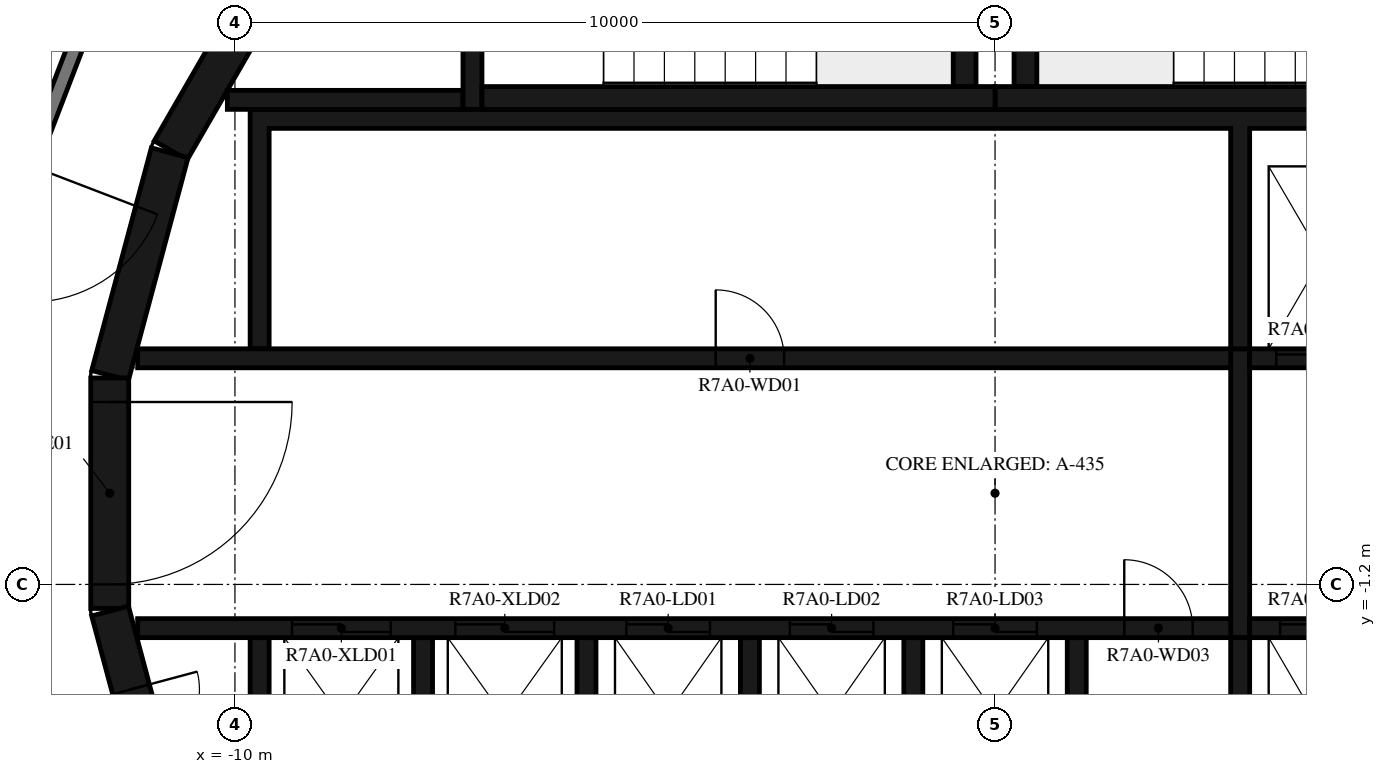
"""IFC4 building model, lengths in metres.
Left out: names, types, materials, properties, quantities, classifications, styles, units other than length and angle.
Written with IfcOpenShell. Run it as: python <this file> out.ifc"""

import sys

from ifc_helpers import new_model, si_unit, direction, frame, frame_2d, origin, place, context, subcontext, project, spatial, polyline, rectangle, outline, extrude, element, fill, save


model = new_model("IFC4")
c1 = context("Model", 3, precision=1e-05, world=origin(), true_north=direction((0.0, 1.0)))
c2 = subcontext(c1, "Body", "Model", "MODEL_VIEW")
j1 = project(units=[si_unit("LENGTHUNIT", "METRE"), si_unit("PLANEANGLEUNIT", "RADIAN")], contexts=[c1])
p1 = place(None, origin())
s1 = spatial("IfcSite", under=j1, at=p1, CompositionType="ELEMENT")
p2 = place(p1, origin())
s2 = spatial("IfcBuilding", under=s1, at=p2, CompositionType="ELEMENT")
p3 = place(p2, frame((0.0, 0.0, 270.4)))
s3 = spatial("IfcBuildingStorey", under=s2, at=p3, CompositionType="ELEMENT", Elevation=270.4)
for number, where, z_axis, x_axis in (
    (1, (-9.329, 7.137, 0.0), (0.0, 0.0, 1.0), (-0.5, -0.866, 0.0)),
    (2, (-10.858, 4.479, 0.0), (0.0, 0.0, 1.0), (-0.259, -0.966, 0.0)),
):
    element("IfcWall", number, at=place(p3, frame(where, z_axis=z_axis, x_axis=x_axis)), inside=s3, PredefinedType="SHEAR", context=c2, shape_type="SweptSolid", body=[
        extrude(rectangle(XDim=3.033, YDim=0.5, at=frame_2d((1.516, 0.0))), origin(), (0.0, 0.0, 1.0), 3.12),
    ])
p4 = place(p3, frame((-11.647, 1.516, 0.0), z_axis=(0.0, 0.0, 1.0), x_axis=(0.0, -1.0, 0.0)))
e3 = element("IfcWall", 3, at=p4, inside=s3, PredefinedType="SHEAR", context=c2, shape_type="SweptSolid", body=[
    extrude(rectangle(XDim=3.033, YDim=0.5, at=frame_2d((1.516, 0.0))), origin(), (0.0, 0.0, 1.0), 3.12),
])
p5 = place(p4, frame((0.316, 0.0, 0.0)))
e4 = element("IfcOpeningElement", 4, at=p5, cuts=e3, PredefinedType="OPENING", context=c2, shape_type="SweptSolid", body=[
    extrude(rectangle(XDim=2.4, YDim=2.1, at=frame_2d((1.2, 1.05))), frame((0.0, 0.26, 0.0), z_axis=(0.0, -1.0, 0.0), x_axis=(1.0, 0.0, 0.0)), (0.0, 0.0, 1.0), 0.52),
])
p6 = place(p3, frame((-11.643, -1.55, 0.0), z_axis=(0.0, 0.0, 1.0), x_axis=(0.258734743916, -0.965948410781, 0.0)))
e5 = element("IfcWall", 5, at=p6, inside=s3, PredefinedType="SHEAR", context=c2, shape_type="SweptSolid", body=[
    extrude(rectangle(XDim=3.033, YDim=0.5, at=frame_2d((1.516, 0.0))), origin(), (0.0, 0.0, 1.0), 3.12),
])
p7 = place(p6, frame((1.066, 0.0, 0.0)))
e6 = element("IfcOpeningElement", 6, at=p7, cuts=e5, PredefinedType="OPENING", context=c2, shape_type="SweptSolid", body=[
    extrude(rectangle(XDim=0.9, YDim=2.1, at=frame_2d((0.45, 1.05))), frame((0.0, 0.26, 0.0), z_axis=(0.0, -1.0, 0.0), x_axis=(1.0, 0.0, 0.0)), (0.0, 0.0, 1.0), 0.52),
])
p8 = place(p3, frame((0.0, 5.2, 0.0), z_axis=(0.0, 0.0, 1.0), x_axis=(1.0, 0.0, 0.0)))
e7 = element("IfcWall", 7, at=p8, inside=s3, PredefinedType="SHEAR", context=c2, shape_type="SweptSolid", body=[
    extrude(rectangle(XDim=6.75, YDim=0.3, at=frame_2d((3.375, 0.0))), origin(), (0.0, 0.0, 1.0), 3.12),
])
p9 = place(p3, frame((0.4, 5.35, 0.0), z_axis=(0.0, 0.0, 1.0), x_axis=(0.0, 1.0, 0.0)))
e8 = element("IfcWall", 8, at=p9, inside=s3, PredefinedType="SHEAR", context=c2, shape_type="SweptSolid", body=[
    extrude(rectangle(XDim=3.32, YDim=0.3, at=frame_2d((1.66, 0.0))), origin(), (0.0, 0.0, 1.0), 3.12),
])
p10 = place(p3, frame((-6.75, 5.2, 0.0), z_axis=(0.0, 0.0, 1.0), x_axis=(1.0, 0.0, 0.0)))
e9 = element("IfcWall", 9, at=p10, inside=s3, PredefinedType="SHEAR", context=c2, shape_type="SweptSolid", body=[
    extrude(rectangle(XDim=6.75, YDim=0.3, at=frame_2d((3.375, 0.0))), origin(), (0.0, 0.0, 1.0), 3.12),
])
p11 = place(p3, frame((-0.4, 5.35, 0.0), z_axis=(0.0, 0.0, 1.0), x_axis=(0.0, 1.0, 0.0)))
e10 = element("IfcWall", 10, at=p11, inside=s3, PredefinedType="SHEAR", context=c2, shape_type="SweptSolid", body=[
    extrude(rectangle(XDim=3.32, YDim=0.3, at=frame_2d((1.66, 0.0))), origin(), (0.0, 0.0, 1.0), 3.12),
])
p12 = place(p3, frame((-6.875, 8.97, 0.0), z_axis=(0.0, 0.0, 1.0), x_axis=(0.0, -1.0, 0.0)))
e11 = element("IfcWall", 11, at=p12, inside=s3, PredefinedType="SHEAR", context=c2, shape_type="SweptSolid", body=[
    extrude(rectangle(XDim=3.92, YDim=0.25, at=frame_2d((1.96, 0.0))), origin(), (0.0, 0.0, 1.0), 3.12),
])
p13 = place(p12, frame((1.61, 0.0, 0.0)))
e12 = element("IfcOpeningElement", 12, at=p13, cuts=e11, PredefinedType="OPENING", context=c2, shape_type="SweptSolid", body=[
    extrude(rectangle(XDim=1.2, YDim=2.1, at=frame_2d((0.6, 1.05))), frame((0.0, 0.135, 0.0), z_axis=(0.0, -1.0, 0.0), x_axis=(1.0, 0.0, 0.0)), (0.0, 0.0, 1.0), 0.27),
])
p14 = place(p3, frame((-7.0, 5.175, 0.0), z_axis=(0.0, 0.0, 1.0), x_axis=(-1.0, 0.0, 0.0)))
e13 = element("IfcWall", 13, at=p14, inside=s3, PredefinedType="SHEAR", context=c2, shape_type="SweptSolid", body=[
    extrude(rectangle(XDim=3.1, YDim=0.25, at=frame_2d((1.55, 0.0))), origin(), (0.0, 0.0, 1.0), 3.12),
])
p15 = place(p3, origin())
e14 = element("IfcWall", 14, at=p15, inside=s3, PredefinedType="SHEAR", context=c2, shape_type="SweptSolid", body=[
    extrude(outline(polyline([(-9.8, 1.9), (-9.55, 1.9), (-9.55, 4.8), (3.1, 4.8), (3.1, 1.9), (3.35, 1.9), (3.35, 4.8), (5.25, 4.8), (5.25, 1.9), (5.5, 1.9), (5.5, 4.8), (7.4, 4.8), (7.4, 1.9), (7.65, 1.9), (7.65, 4.8), (9.55, 4.8), (9.55, 1.9), (9.8, 1.9), (9.8, 4.8), (9.8, 5.05), (-9.8, 5.05), (-9.8, 4.8), (-9.8, 1.9)])), origin(), (0.0, 0.0, 1.0), 3.12),
])
p16 = place(p3, origin())
e15 = element("IfcWall", 15, at=p16, inside=s3, PredefinedType="SHEAR", context=c2, shape_type="SweptSolid", body=[
    extrude(outline(polyline([(9.8, -5.05), (9.8, -4.8), (9.8, -1.9), (9.55, -1.9), (9.55, -4.8), (7.65, -4.8), (7.65, -1.9), (7.4, -1.9), (7.4, -4.8), (5.5, -4.8), (5.5, -1.9), (5.25, -1.9), (5.25, -4.8), (3.35, -4.8), (3.35, -1.9), (3.1, -1.9), (3.1, -4.8), (1.2, -4.8), (1.2, -1.9), (0.95, -1.9), (0.95, -4.8), (-0.95, -4.8), (-0.95, -1.9), (-1.2, -1.9), (-1.2, -4.8), (-3.1, -4.8), (-3.1, -1.9), (-3.35, -1.9), (-3.35, -4.8), (-5.25, -4.8), (-5.25, -1.9), (-5.5, -1.9), (-5.5, -4.8), (-7.4, -4.8), (-7.4, -1.9), (-7.65, -1.9), (-7.65, -4.8), (-9.55, -4.8), (-9.55, -1.9), (-9.8, -1.9), (-9.8, -4.8), (-9.8, -5.05), (9.8, -5.05)])), origin(), (0.0, 0.0, 1.0), 3.12),
])
p17 = place(p3, frame((-11.28, 1.775, 0.0), z_axis=(0.0, 0.0, 1.0), x_axis=(1.0, 0.0, 0.0)))
e16 = element("IfcWall", 16, at=p17, inside=s3, PredefinedType="SHEAR", context=c2, shape_type="SweptSolid", body=[
    extrude(rectangle(XDim=14.38, YDim=0.25, at=frame_2d((7.19, 0.0))), origin(), (0.0, 0.0, 1.0), 3.12),
])
p18 = place(p17, frame((7.605, 0.0, 0.0)))
e17 = element("IfcOpeningElement", 17, at=p18, cuts=e16, PredefinedType="OPENING", context=c2, shape_type="SweptSolid", body=[
    extrude(rectangle(XDim=0.9, YDim=2.1, at=frame_2d((0.45, 1.05))), frame((0.0, 0.135, 0.0), z_axis=(0.0, -1.0, 0.0), x_axis=(1.0, 0.0, 0.0)), (0.0, 0.0, 1.0), 0.27),
])
p19 = place(p3, frame((3.35, 1.775, 0.0), z_axis=(0.0, 0.0, 1.0), x_axis=(1.0, 0.0, 0.0)))
e18 = element("IfcWall", 18, at=p19, inside=s3, PredefinedType="SHEAR", context=c2, shape_type="SweptSolid", body=[
    extrude(rectangle(XDim=7.93, YDim=0.25, at=frame_2d((3.965, 0.0))), origin(), (0.0, 0.0, 1.0), 3.12),
])
p20 = place(p19, frame((0.35, 0.0, 0.0)))
e19 = element("IfcOpeningElement", 19, at=p20, cuts=e18, PredefinedType="OPENING", context=c2, shape_type="SweptSolid", body=[
    extrude(rectangle(XDim=1.2, YDim=2.4, at=frame_2d((0.6, 1.2))), frame((0.0, 0.135, 0.0), z_axis=(0.0, -1.0, 0.0), x_axis=(1.0, 0.0, 0.0)), (0.0, 0.0, 1.0), 0.27),
])
p21 = place(p19, frame((2.5, 0.0, 0.0)))
e20 = element("IfcOpeningElement", 20, at=p21, cuts=e18, PredefinedType="OPENING", context=c2, shape_type="SweptSolid", body=[
    extrude(rectangle(XDim=1.2, YDim=2.4, at=frame_2d((0.6, 1.2))), frame((0.0, 0.135, 0.0), z_axis=(0.0, -1.0, 0.0), x_axis=(1.0, 0.0, 0.0)), (0.0, 0.0, 1.0), 0.27),
])
p22 = place(p19, frame((4.8, 0.0, 0.0)))
e21 = element("IfcOpeningElement", 21, at=p22, cuts=e18, PredefinedType="OPENING", context=c2, shape_type="SweptSolid", body=[
    extrude(rectangle(XDim=0.9, YDim=2.1, at=frame_2d((0.45, 1.05))), frame((0.0, 0.135, 0.0), z_axis=(0.0, -1.0, 0.0), x_axis=(1.0, 0.0, 0.0)), (0.0, 0.0, 1.0), 0.27),
])
p23 = place(p3, frame((-11.28, -1.775, 0.0), z_axis=(0.0, 0.0, 1.0), x_axis=(1.0, 0.0, 0.0)))
e22 = element("IfcWall", 22, at=p23, inside=s3, PredefinedType="SHEAR", context=c2, shape_type="SweptSolid", body=[
    extrude(rectangle(XDim=14.38, YDim=0.25, at=frame_2d((7.19, 0.0))), origin(), (0.0, 0.0, 1.0), 3.12),
])
p24 = place(p23, frame((2.03, 0.0, 0.0)))
e23 = element("IfcOpeningElement", 23, at=p24, cuts=e22, PredefinedType="OPENING", context=c2, shape_type="SweptSolid", body=[
    extrude(rectangle(XDim=1.3, YDim=2.1, at=frame_2d((0.65, 1.05))), frame((0.0, 0.135, 0.0), z_axis=(0.0, -1.0, 0.0), x_axis=(1.0, 0.0, 0.0)), (0.0, 0.0, 1.0), 0.27),
])
p25 = place(p23, frame((4.18, 0.0, 0.0)))
e24 = element("IfcOpeningElement", 24, at=p25, cuts=e22, PredefinedType="OPENING", context=c2, shape_type="SweptSolid", body=[
    extrude(rectangle(XDim=1.3, YDim=2.1, at=frame_2d((0.65, 1.05))), frame((0.0, 0.135, 0.0), z_axis=(0.0, -1.0, 0.0), x_axis=(1.0, 0.0, 0.0)), (0.0, 0.0, 1.0), 0.27),
])
p26 = place(p23, frame((6.43, 0.0, 0.0)))
e25 = element("IfcOpeningElement", 25, at=p26, cuts=e22, PredefinedType="OPENING", context=c2, shape_type="SweptSolid", body=[
    extrude(rectangle(XDim=1.1, YDim=2.1, at=frame_2d((0.55, 1.05))), frame((0.0, 0.135, 0.0), z_axis=(0.0, -1.0, 0.0), x_axis=(1.0, 0.0, 0.0)), (0.0, 0.0, 1.0), 0.27),
])
p27 = place(p23, frame((8.58, 0.0, 0.0)))
e26 = element("IfcOpeningElement", 26, at=p27, cuts=e22, PredefinedType="OPENING", context=c2, shape_type="SweptSolid", body=[
    extrude(rectangle(XDim=1.1, YDim=2.1, at=frame_2d((0.55, 1.05))), frame((0.0, 0.135, 0.0), z_axis=(0.0, -1.0, 0.0), x_axis=(1.0, 0.0, 0.0)), (0.0, 0.0, 1.0), 0.27),
])
p28 = place(p23, frame((10.73, 0.0, 0.0)))
e27 = element("IfcOpeningElement", 27, at=p28, cuts=e22, PredefinedType="OPENING", context=c2, shape_type="SweptSolid", body=[
    extrude(rectangle(XDim=1.1, YDim=2.1, at=frame_2d((0.55, 1.05))), frame((0.0, 0.135, 0.0), z_axis=(0.0, -1.0, 0.0), x_axis=(1.0, 0.0, 0.0)), (0.0, 0.0, 1.0), 0.27),
])
p29 = place(p23, frame((12.98, 0.0, 0.0)))
e28 = element("IfcOpeningElement", 28, at=p29, cuts=e22, PredefinedType="OPENING", context=c2, shape_type="SweptSolid", body=[
    extrude(rectangle(XDim=0.9, YDim=2.1, at=frame_2d((0.45, 1.05))), frame((0.0, 0.135, 0.0), z_axis=(0.0, -1.0, 0.0), x_axis=(1.0, 0.0, 0.0)), (0.0, 0.0, 1.0), 0.27),
])
p30 = place(p3, frame((3.35, -1.775, 0.0), z_axis=(0.0, 0.0, 1.0), x_axis=(1.0, 0.0, 0.0)))
e29 = element("IfcWall", 29, at=p30, inside=s3, PredefinedType="SHEAR", context=c2, shape_type="SweptSolid", body=[
    extrude(rectangle(XDim=7.93, YDim=0.25, at=frame_2d((3.965, 0.0))), origin(), (0.0, 0.0, 1.0), 3.12),
])
p31 = place(p30, frame((0.4, 0.0, 0.0)))
e30 = element("IfcOpeningElement", 30, at=p31, cuts=e29, PredefinedType="OPENING", context=c2, shape_type="SweptSolid", body=[
    extrude(rectangle(XDim=1.1, YDim=2.4, at=frame_2d((0.55, 1.2))), frame((0.0, 0.135, 0.0), z_axis=(0.0, -1.0, 0.0), x_axis=(1.0, 0.0, 0.0)), (0.0, 0.0, 1.0), 0.27),
])
p32 = place(p30, frame((2.55, 0.0, 0.0)))
e31 = element("IfcOpeningElement", 31, at=p32, cuts=e29, PredefinedType="OPENING", context=c2, shape_type="SweptSolid", body=[
    extrude(rectangle(XDim=1.1, YDim=2.4, at=frame_2d((0.55, 1.2))), frame((0.0, 0.135, 0.0), z_axis=(0.0, -1.0, 0.0), x_axis=(1.0, 0.0, 0.0)), (0.0, 0.0, 1.0), 0.27),
])
p33 = place(p30, frame((4.7, 0.0, 0.0)))
e32 = element("IfcOpeningElement", 32, at=p33, cuts=e29, PredefinedType="OPENING", context=c2, shape_type="SweptSolid", body=[
    extrude(rectangle(XDim=1.1, YDim=2.4, at=frame_2d((0.55, 1.2))), frame((0.0, 0.135, 0.0), z_axis=(0.0, -1.0, 0.0), x_axis=(1.0, 0.0, 0.0)), (0.0, 0.0, 1.0), 0.27),
])
p34 = place(p3, frame((3.225, -1.9, 0.0), z_axis=(0.0, 0.0, 1.0), x_axis=(0.0, 1.0, 0.0)))
e33 = element("IfcWall", 33, at=p34, inside=s3, PredefinedType="SHEAR", context=c2, shape_type="SweptSolid", body=[
    extrude(rectangle(XDim=3.8, YDim=0.25, at=frame_2d((1.9, 0.0))), origin(), (0.0, 0.0, 1.0), 3.12),
])
p35 = place(p3, frame((-11.223, 8.154, 0.0), z_axis=(0.0, 0.0, 1.0), x_axis=(-0.358341090983, -0.93359073609, 0.0)))
e34 = element("IfcWall", 34, at=p35, inside=s3, PredefinedType="STANDARD", context=c2, shape_type="SweptSolid", body=[
    extrude(rectangle(XDim=7.181, YDim=0.2, at=frame_2d((3.59, 0.0))), origin(), (0.0, 0.0, 1.0), 3.12),
])
p36 = place(p35, frame((4.114, 0.0, 0.0)))
e35 = element("IfcOpeningElement", 35, at=p36, cuts=e34, PredefinedType="OPENING", context=c2, shape_type="SweptSolid", body=[
    extrude(rectangle(XDim=1.8, YDim=2.1, at=frame_2d((0.9, 1.05))), frame((0.0, 0.11, 0.0), z_axis=(0.0, -1.0, 0.0), x_axis=(1.0, 0.0, 0.0)), (0.0, 0.0, 1.0), 0.22),
])
p37 = place(p5, origin())
e36 = element("IfcDoor", 36, at=p37, inside=s3, OperationType="DOUBLE_DOOR_SINGLE_SWING", PredefinedType="DOOR", context=c2, shape_type="SweptSolid", body=[
    extrude(rectangle(XDim=2.4, YDim=2.1, at=frame_2d((1.2, 1.05))), frame((0.0, 0.025, 0.0), z_axis=(0.0, -1.0, 0.0), x_axis=(1.0, 0.0, 0.0)), (0.0, 0.0, 1.0), 0.05),
])
fill(e4, e36)
p38 = place(p20, origin())
e37 = element("IfcDoor", 37, at=p38, inside=s3, OperationType="DOUBLE_DOOR_SLIDING", PredefinedType="DOOR", context=c2, shape_type="SweptSolid", body=[
    extrude(rectangle(XDim=1.2, YDim=2.4, at=frame_2d((0.6, 1.2))), frame((0.0, 0.025, 0.0), z_axis=(0.0, -1.0, 0.0), x_axis=(1.0, 0.0, 0.0)), (0.0, 0.0, 1.0), 0.05),
])
fill(e19, e37)
p39 = place(p24, origin())
e38 = element("IfcDoor", 38, at=p39, inside=s3, OperationType="DOUBLE_DOOR_SLIDING", PredefinedType="DOOR", context=c2, shape_type="SweptSolid", body=[
    extrude(rectangle(XDim=1.3, YDim=2.1, at=frame_2d((0.65, 1.05))), frame((0.0, 0.025, 0.0), z_axis=(0.0, -1.0, 0.0), x_axis=(1.0, 0.0, 0.0)), (0.0, 0.0, 1.0), 0.05),
])
fill(e23, e38)
p40 = place(p25, origin())
e39 = element("IfcDoor", 39, at=p40, inside=s3, OperationType="DOUBLE_DOOR_SLIDING", PredefinedType="DOOR", context=c2, shape_type="SweptSolid", body=[
    extrude(rectangle(XDim=1.3, YDim=2.1, at=frame_2d((0.65, 1.05))), frame((0.0, 0.025, 0.0), z_axis=(0.0, -1.0, 0.0), x_axis=(1.0, 0.0, 0.0)), (0.0, 0.0, 1.0), 0.05),
])
fill(e24, e39)
p41 = place(p26, origin())
e40 = element("IfcDoor", 40, at=p41, inside=s3, OperationType="DOUBLE_DOOR_SLIDING", PredefinedType="DOOR", context=c2, shape_type="SweptSolid", body=[
    extrude(rectangle(XDim=1.1, YDim=2.1, at=frame_2d((0.55, 1.05))), frame((0.0, 0.025, 0.0), z_axis=(0.0, -1.0, 0.0), x_axis=(1.0, 0.0, 0.0)), (0.0, 0.0, 1.0), 0.05),
])
fill(e25, e40)
p42 = place(p27, origin())
e41 = element("IfcDoor", 41, at=p42, inside=s3, OperationType="DOUBLE_DOOR_SLIDING", PredefinedType="DOOR", context=c2, shape_type="SweptSolid", body=[
    extrude(rectangle(XDim=1.1, YDim=2.1, at=frame_2d((0.55, 1.05))), frame((0.0, 0.025, 0.0), z_axis=(0.0, -1.0, 0.0), x_axis=(1.0, 0.0, 0.0)), (0.0, 0.0, 1.0), 0.05),
])
fill(e26, e41)
p43 = place(p28, origin())
e42 = element("IfcDoor", 42, at=p43, inside=s3, OperationType="DOUBLE_DOOR_SLIDING", PredefinedType="DOOR", context=c2, shape_type="SweptSolid", body=[
    extrude(rectangle(XDim=1.1, YDim=2.1, at=frame_2d((0.55, 1.05))), frame((0.0, 0.025, 0.0), z_axis=(0.0, -1.0, 0.0), x_axis=(1.0, 0.0, 0.0)), (0.0, 0.0, 1.0), 0.05),
])
fill(e27, e42)
p44 = place(p31, origin())
e43 = element("IfcDoor", 43, at=p44, inside=s3, OperationType="DOUBLE_DOOR_SLIDING", PredefinedType="DOOR", context=c2, shape_type="SweptSolid", body=[
    extrude(rectangle(XDim=1.1, YDim=2.4, at=frame_2d((0.55, 1.2))), frame((0.0, 0.025, 0.0), z_axis=(0.0, -1.0, 0.0), x_axis=(1.0, 0.0, 0.0)), (0.0, 0.0, 1.0), 0.05),
])
fill(e30, e43)
p45 = place(p18, origin())
e44 = element("IfcDoor", 44, at=p45, inside=s3, OperationType="SINGLE_SWING_LEFT", PredefinedType="DOOR", context=c2, shape_type="SweptSolid", body=[
    extrude(rectangle(XDim=0.9, YDim=2.1, at=frame_2d((0.45, 1.05))), frame((0.0, 0.025, 0.0), z_axis=(0.0, -1.0, 0.0), x_axis=(1.0, 0.0, 0.0)), (0.0, 0.0, 1.0), 0.05),
])
fill(e17, e44)
p46 = place(p29, origin())
e45 = element("IfcDoor", 45, at=p46, inside=s3, OperationType="SINGLE_SWING_LEFT", PredefinedType="DOOR", context=c2, shape_type="SweptSolid", body=[
    extrude(rectangle(XDim=0.9, YDim=2.1, at=frame_2d((0.45, 1.05))), frame((0.0, 0.025, 0.0), z_axis=(0.0, -1.0, 0.0), x_axis=(1.0, 0.0, 0.0)), (0.0, 0.0, 1.0), 0.05),
])
fill(e28, e45)
p47 = place(p7, origin())
e46 = element("IfcDoor", 46, at=p47, inside=s3, OperationType="SINGLE_SWING_RIGHT", PredefinedType="DOOR", context=c2, shape_type="SweptSolid", body=[
    extrude(rectangle(XDim=0.9, YDim=2.1, at=frame_2d((0.45, 1.05))), frame((0.0, 0.025, 0.0), z_axis=(0.0, -1.0, 0.0), x_axis=(1.0, 0.0, 0.0)), (0.0, 0.0, 1.0), 0.05),
])
fill(e6, e46)
save(model, sys.argv[1])
